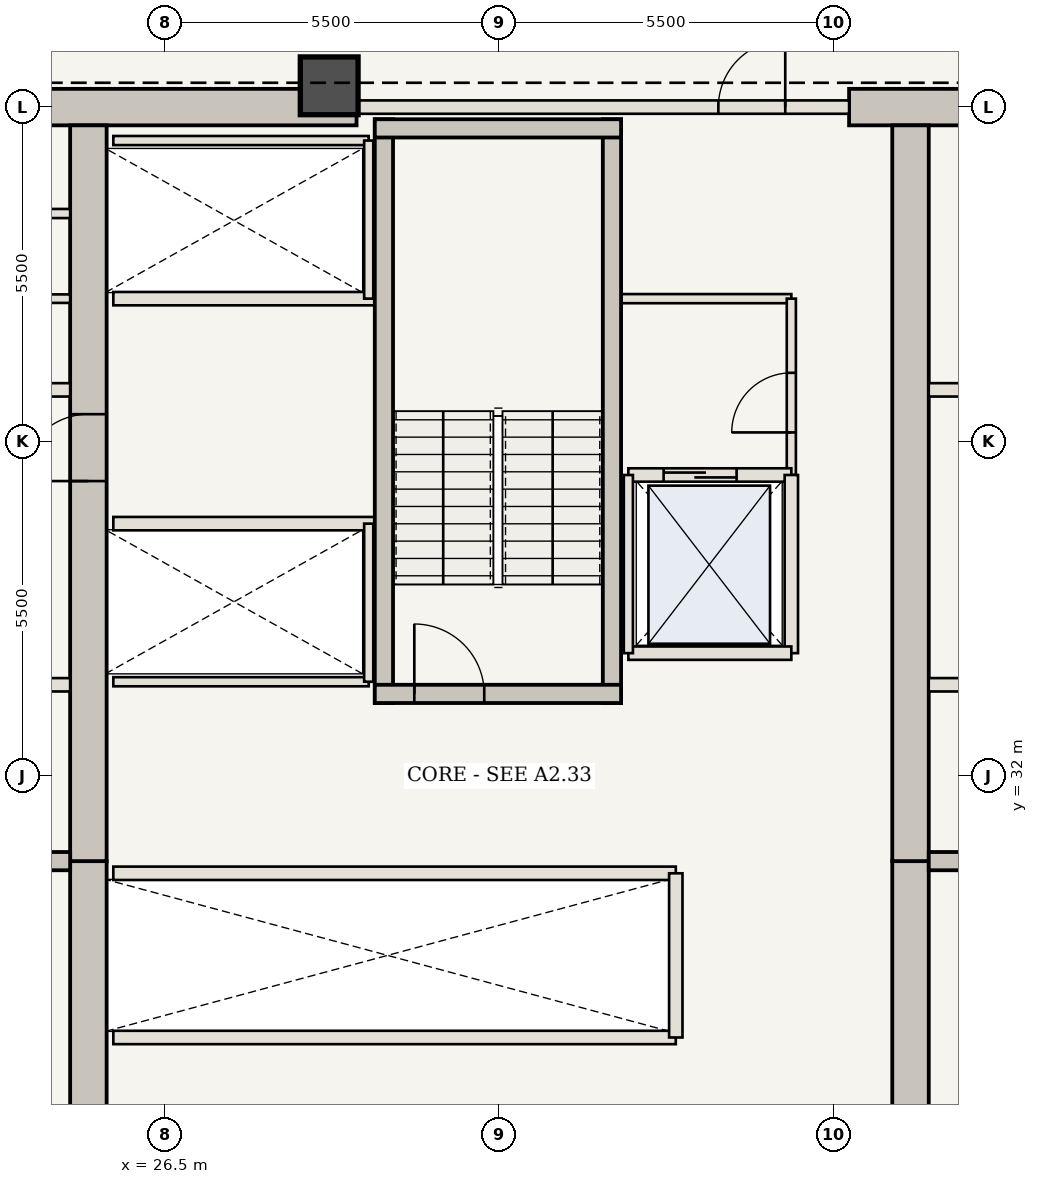
"""IFC4 building model, lengths in metres.
Left out: names, types, materials, properties, quantities, classifications, styles, units other than length and angle.
Written with IfcOpenShell. Run it as: python <this file> out.ifc"""

import sys

from ifc_helpers import new_model, si_unit, direction, frame, frame_2d, origin, origin_2d, place, context, subcontext, project, spatial, rectangle, extrude, element, fill, save


model = new_model("IFC4")
c1 = context("Model", 3, precision=1e-05, world=origin(), true_north=direction((0.0, 1.0)))
c2 = subcontext(c1, "Body", "Model", "MODEL_VIEW")
j1 = project(units=[si_unit("LENGTHUNIT", "METRE"), si_unit("PLANEANGLEUNIT", "RADIAN")], contexts=[c1])
p1 = place(None, origin())
s1 = spatial("IfcSite", under=j1, at=p1, CompositionType="ELEMENT")
p2 = place(p1, origin())
s2 = spatial("IfcBuilding", under=s1, at=p2, CompositionType="ELEMENT")
p3 = place(p2, frame((0.0, 0.0, 141.4)))
s3 = spatial("IfcBuildingStorey", under=s2, at=p3, CompositionType="ELEMENT", Elevation=141.4)
p4 = place(p3, frame((21.41, 43.0, 0.0), z_axis=(0.0, 0.0, 1.0), x_axis=(1.0, 0.0, 0.0)))
e1 = element("IfcWall", 1, at=p4, inside=s3, PredefinedType="SHEAR", context=c2, shape_type="SweptSolid", body=[
    extrude(rectangle(XDim=8.24, YDim=0.6, at=frame_2d((4.12, 0.0))), origin(), (0.0, 0.0, 1.0), 3.85),
])
p5 = place(p3, frame((37.75, 43.0, 0.0), z_axis=(0.0, 0.0, 1.0), x_axis=(1.0, 0.0, 0.0)))
e2 = element("IfcWall", 2, at=p5, inside=s3, PredefinedType="SHEAR", context=c2, shape_type="SweptSolid", body=[
    extrude(rectangle(XDim=4.84, YDim=0.6, at=frame_2d((2.42, 0.0))), origin(), (0.0, 0.0, 1.0), 3.85),
])
p6 = place(p3, frame((25.24, 21.25, 0.0), z_axis=(0.0, 0.0, 1.0), x_axis=(0.0, 1.0, 0.0)))
e3 = element("IfcWall", 3, at=p6, inside=s3, PredefinedType="SHEAR", context=c2, shape_type="SweptSolid", body=[
    extrude(rectangle(XDim=9.35, YDim=0.6, at=frame_2d((4.675, 0.0))), origin(), (0.0, 0.0, 1.0), 3.85),
])
p7 = place(p3, frame((25.24, 30.6, 0.0), z_axis=(0.0, 0.0, 1.0), x_axis=(0.0, 1.0, 0.0)))
e4 = element("IfcWall", 4, at=p7, inside=s3, PredefinedType="SHEAR", context=c2, shape_type="SweptSolid", body=[
    extrude(rectangle(XDim=12.1, YDim=0.6, at=frame_2d((6.05, 0.0))), origin(), (0.0, 0.0, 1.0), 3.85),
])
p8 = place(p7, frame((6.25, 0.0, 0.0)))
e5 = element("IfcOpeningElement", 5, at=p8, cuts=e4, PredefinedType="OPENING", context=c2, shape_type="SweptSolid", body=[
    extrude(rectangle(XDim=1.1, YDim=2.15, at=frame_2d((0.55, 1.075))), frame((0.0, 0.31, 0.0), z_axis=(0.0, -1.0, 0.0), x_axis=(1.0, 0.0, 0.0)), (0.0, 0.0, 1.0), 0.62),
])
p9 = place(p3, frame((38.76, 21.25, 0.0), z_axis=(0.0, 0.0, 1.0), x_axis=(0.0, 1.0, 0.0)))
e6 = element("IfcWall", 6, at=p9, inside=s3, PredefinedType="SHEAR", context=c2, shape_type="SweptSolid", body=[
    extrude(rectangle(XDim=9.35, YDim=0.6, at=frame_2d((4.675, 0.0))), origin(), (0.0, 0.0, 1.0), 3.85),
])
p10 = place(p3, frame((38.76, 30.6, 0.0), z_axis=(0.0, 0.0, 1.0), x_axis=(0.0, 1.0, 0.0)))
e7 = element("IfcWall", 7, at=p10, inside=s3, PredefinedType="SHEAR", context=c2, shape_type="SweptSolid", body=[
    extrude(rectangle(XDim=12.1, YDim=0.6, at=frame_2d((6.05, 0.0))), origin(), (0.0, 0.0, 1.0), 3.85),
])
p11 = place(p3, frame((29.2, 43.35, 0.0), z_axis=(0.0, 0.0, 1.0), x_axis=(1.0, 0.0, 0.0)))
e8 = element("IfcColumn", 8, at=p11, inside=s3, PredefinedType="COLUMN", context=c2, shape_type="SweptSolid", body=[
    extrude(rectangle(XDim=0.95, YDim=0.95, at=origin_2d()), origin(), (0.0, 0.0, 1.0), 3.85),
])
for number, where, z_axis, x_axis in (
    (9, (21.41, 30.6, 0.0), (0.0, 0.0, 1.0), (1.0, 0.0, 0.0)),
    (10, (39.06, 30.6, 0.0), (0.0, 0.0, 1.0), (1.0, 0.0, 0.0)),
):
    element("IfcWall", number, at=place(p3, frame(where, z_axis=z_axis, x_axis=x_axis)), inside=s3, PredefinedType="SHEAR", context=c2, shape_type="SweptSolid", body=[
        extrude(rectangle(XDim=3.53, YDim=0.3, at=frame_2d((1.765, 0.0))), origin(), (0.0, 0.0, 1.0), 3.685),
    ])
p12 = place(p3, frame((21.41, 33.5, 0.0), z_axis=(0.0, 0.0, 1.0), x_axis=(1.0, 0.0, 0.0)))
e11 = element("IfcWall", 11, at=p12, inside=s3, PredefinedType="STANDARD", context=c2, shape_type="SweptSolid", body=[
    extrude(rectangle(XDim=3.53, YDim=0.22, at=frame_2d((1.765, 0.0))), origin(), (0.0, 0.0, 1.0), 3.685),
])
p13 = place(p12, frame((0.75, 0.0, 0.0)))
e12 = element("IfcOpeningElement", 12, at=p13, cuts=e11, PredefinedType="OPENING", context=c2, shape_type="SweptSolid", body=[
    extrude(rectangle(XDim=1.2, YDim=2.2, at=frame_2d((0.6, 1.1))), frame((0.0, 0.12, 0.0), z_axis=(0.0, -1.0, 0.0), x_axis=(1.0, 0.0, 0.0)), (0.0, 0.0, 1.0), 0.24),
])
p14 = place(p3, frame((39.06, 33.5, 0.0), z_axis=(0.0, 0.0, 1.0), x_axis=(1.0, 0.0, 0.0)))
e13 = element("IfcWall", 13, at=p14, inside=s3, PredefinedType="STANDARD", context=c2, shape_type="SweptSolid", body=[
    extrude(rectangle(XDim=3.53, YDim=0.22, at=frame_2d((1.765, 0.0))), origin(), (0.0, 0.0, 1.0), 3.685),
])
p15 = place(p14, frame((1.55, 0.0, 0.0)))
e14 = element("IfcOpeningElement", 14, at=p15, cuts=e13, PredefinedType="OPENING", context=c2, shape_type="SweptSolid", body=[
    extrude(rectangle(XDim=1.2, YDim=2.2, at=frame_2d((0.6, 1.1))), frame((0.0, 0.12, 0.0), z_axis=(0.0, -1.0, 0.0), x_axis=(1.0, 0.0, 0.0)), (0.0, 0.0, 1.0), 0.24),
])
for number, where, z_axis, x_axis in (
    (15, (21.41, 38.35, 0.0), (0.0, 0.0, 1.0), (1.0, 0.0, 0.0)),
    (16, (39.06, 38.35, 0.0), (0.0, 0.0, 1.0), (1.0, 0.0, 0.0)),
):
    element("IfcWall", number, at=place(p3, frame(where, z_axis=z_axis, x_axis=x_axis)), inside=s3, PredefinedType="STANDARD", context=c2, shape_type="SweptSolid", body=[
        extrude(rectangle(XDim=3.53, YDim=0.22, at=frame_2d((1.765, 0.0))), origin(), (0.0, 0.0, 1.0), 3.685),
    ])
p16 = place(p3, frame((21.41, 39.85, 0.0), z_axis=(0.0, 0.0, 1.0), x_axis=(1.0, 0.0, 0.0)))
e17 = element("IfcWall", 17, at=p16, inside=s3, PredefinedType="STANDARD", context=c2, shape_type="SweptSolid", body=[
    extrude(rectangle(XDim=3.53, YDim=0.14, at=frame_2d((1.765, 0.0))), origin(), (0.0, 0.0, 1.0), 3.685),
])
p17 = place(p3, frame((21.41, 41.25, 0.0), z_axis=(0.0, 0.0, 1.0), x_axis=(1.0, 0.0, 0.0)))
e18 = element("IfcWall", 18, at=p17, inside=s3, PredefinedType="STANDARD", context=c2, shape_type="SweptSolid", body=[
    extrude(rectangle(XDim=3.53, YDim=0.15, at=frame_2d((1.765, 0.0))), origin(), (0.0, 0.0, 1.0), 3.685),
])
p18 = place(p3, frame((34.0, 39.85, 0.0), z_axis=(0.0, 0.0, 1.0), x_axis=(1.0, 0.0, 0.0)))
e19 = element("IfcWall", 19, at=p18, inside=s3, PredefinedType="STANDARD", context=c2, shape_type="SweptSolid", body=[
    extrude(rectangle(XDim=2.8, YDim=0.15, at=frame_2d((1.4, 0.0))), origin(), (0.0, 0.0, 1.0), 3.685),
])
p19 = place(p3, frame((36.8, 36.95, 0.0), z_axis=(0.0, 0.0, 1.0), x_axis=(0.0, 1.0, 0.0)))
e20 = element("IfcWall", 20, at=p19, inside=s3, PredefinedType="STANDARD", context=c2, shape_type="SweptSolid", body=[
    extrude(rectangle(XDim=2.9, YDim=0.15, at=frame_2d((1.45, 0.0))), origin(), (0.0, 0.0, 1.0), 3.685),
])
p20 = place(p19, frame((0.7, 0.0, 0.0)))
e21 = element("IfcOpeningElement", 21, at=p20, cuts=e20, PredefinedType="OPENING", context=c2, shape_type="SweptSolid", body=[
    extrude(rectangle(XDim=0.98, YDim=2.2, at=frame_2d((0.49, 1.1))), frame((0.0, 0.085, 0.0), z_axis=(0.0, -1.0, 0.0), x_axis=(1.0, 0.0, 0.0)), (0.0, 0.0, 1.0), 0.17),
])
for number, where, z_axis, x_axis in (
    (22, (25.65, 27.7, 0.0), (0.0, 0.0, 1.0), (1.0, 0.0, 0.0)),
    (23, (25.65, 30.4, 0.0), (0.0, 0.0, 1.0), (1.0, 0.0, 0.0)),
):
    element("IfcWall", number, at=place(p3, frame(where, z_axis=z_axis, x_axis=x_axis)), inside=s3, PredefinedType="STANDARD", context=c2, shape_type="SweptSolid", body=[
        extrude(rectangle(XDim=9.25, YDim=0.22, at=frame_2d((4.625, 0.0))), origin(), (0.0, 0.0, 1.0), 3.685),
    ])
p21 = place(p3, frame((34.9, 27.7, 0.0), z_axis=(0.0, 0.0, 1.0), x_axis=(0.0, 1.0, 0.0)))
e24 = element("IfcWall", 24, at=p21, inside=s3, PredefinedType="STANDARD", context=c2, shape_type="SweptSolid", body=[
    extrude(rectangle(XDim=2.7, YDim=0.22, at=frame_2d((1.35, 0.0))), origin(), (0.0, 0.0, 1.0), 3.685),
])
p22 = place(p3, frame((25.65, 36.15, 0.0), z_axis=(0.0, 0.0, 1.0), x_axis=(1.0, 0.0, 0.0)))
e25 = element("IfcWall", 25, at=p22, inside=s3, PredefinedType="STANDARD", context=c2, shape_type="SweptSolid", body=[
    extrude(rectangle(XDim=4.3, YDim=0.22, at=frame_2d((2.15, 0.0))), origin(), (0.0, 0.0, 1.0), 3.685),
])
p23 = place(p3, frame((25.65, 33.55, 0.0), z_axis=(0.0, 0.0, 1.0), x_axis=(1.0, 0.0, 0.0)))
e26 = element("IfcWall", 26, at=p23, inside=s3, PredefinedType="STANDARD", context=c2, shape_type="SweptSolid", body=[
    extrude(rectangle(XDim=4.2, YDim=0.15, at=frame_2d((2.1, 0.0))), origin(), (0.0, 0.0, 1.0), 3.685),
])
p24 = place(p3, frame((29.85, 33.55, 0.0), z_axis=(0.0, 0.0, 1.0), x_axis=(0.0, 1.0, 0.0)))
e27 = element("IfcWall", 27, at=p24, inside=s3, PredefinedType="STANDARD", context=c2, shape_type="SweptSolid", body=[
    extrude(rectangle(XDim=2.6, YDim=0.15, at=frame_2d((1.3, 0.0))), origin(), (0.0, 0.0, 1.0), 3.685),
])
p25 = place(p3, frame((25.65, 39.85, 0.0), z_axis=(0.0, 0.0, 1.0), x_axis=(1.0, 0.0, 0.0)))
e28 = element("IfcWall", 28, at=p25, inside=s3, PredefinedType="STANDARD", context=c2, shape_type="SweptSolid", body=[
    extrude(rectangle(XDim=4.3, YDim=0.22, at=frame_2d((2.15, 0.0))), origin(), (0.0, 0.0, 1.0), 3.685),
])
p26 = place(p3, frame((25.65, 42.45, 0.0), z_axis=(0.0, 0.0, 1.0), x_axis=(1.0, 0.0, 0.0)))
e29 = element("IfcWall", 29, at=p26, inside=s3, PredefinedType="STANDARD", context=c2, shape_type="SweptSolid", body=[
    extrude(rectangle(XDim=4.2, YDim=0.15, at=frame_2d((2.1, 0.0))), origin(), (0.0, 0.0, 1.0), 3.685),
])
p27 = place(p3, frame((29.85, 39.85, 0.0), z_axis=(0.0, 0.0, 1.0), x_axis=(0.0, 1.0, 0.0)))
e30 = element("IfcWall", 30, at=p27, inside=s3, PredefinedType="STANDARD", context=c2, shape_type="SweptSolid", body=[
    extrude(rectangle(XDim=2.6, YDim=0.15, at=frame_2d((1.3, 0.0))), origin(), (0.0, 0.0, 1.0), 3.685),
])
for number, where, z_axis, x_axis in (
    (31, (30.1, 33.2, 0.0), (0.0, 0.0, 1.0), (0.0, 1.0, 0.0)),
    (32, (33.85, 33.2, 0.0), (0.0, 0.0, 1.0), (0.0, 1.0, 0.0)),
):
    element("IfcWall", number, at=place(p3, frame(where, z_axis=z_axis, x_axis=x_axis)), inside=s3, PredefinedType="SHEAR", context=c2, shape_type="SweptSolid", body=[
        extrude(rectangle(XDim=9.6, YDim=0.3, at=frame_2d((4.8, 0.0))), origin(), (0.0, 0.0, 1.0), 3.685),
    ])
p28 = place(p3, frame((29.95, 33.35, 0.0), z_axis=(0.0, 0.0, 1.0), x_axis=(1.0, 0.0, 0.0)))
e33 = element("IfcWall", 33, at=p28, inside=s3, PredefinedType="SHEAR", context=c2, shape_type="SweptSolid", body=[
    extrude(rectangle(XDim=4.05, YDim=0.3, at=frame_2d((2.025, 0.0))), origin(), (0.0, 0.0, 1.0), 3.685),
])
p29 = place(p28, frame((0.65, 0.0, 0.0)))
e34 = element("IfcOpeningElement", 34, at=p29, cuts=e33, PredefinedType="OPENING", context=c2, shape_type="SweptSolid", body=[
    extrude(rectangle(XDim=1.15, YDim=2.15, at=frame_2d((0.575, 1.075))), frame((0.0, 0.16, 0.0), z_axis=(0.0, -1.0, 0.0), x_axis=(1.0, 0.0, 0.0)), (0.0, 0.0, 1.0), 0.32),
])
p30 = place(p3, frame((29.95, 42.65, 0.0), z_axis=(0.0, 0.0, 1.0), x_axis=(1.0, 0.0, 0.0)))
e35 = element("IfcWall", 35, at=p30, inside=s3, PredefinedType="SHEAR", context=c2, shape_type="SweptSolid", body=[
    extrude(rectangle(XDim=4.05, YDim=0.3, at=frame_2d((2.025, 0.0))), origin(), (0.0, 0.0, 1.0), 3.685),
])
p31 = place(p3, frame((29.65, 43.0, 0.0), z_axis=(0.0, 0.0, 1.0), x_axis=(1.0, 0.0, 0.0)))
e36 = element("IfcWall", 36, at=p31, inside=s3, PredefinedType="STANDARD", context=c2, shape_type="SweptSolid", body=[
    extrude(rectangle(XDim=8.1, YDim=0.22, at=frame_2d((4.05, 0.0))), origin(), (0.0, 0.0, 1.0), 3.685),
])
p32 = place(p31, frame((5.95, 0.0, 0.0)))
e37 = element("IfcOpeningElement", 37, at=p32, cuts=e36, PredefinedType="OPENING", context=c2, shape_type="SweptSolid", body=[
    extrude(rectangle(XDim=1.1, YDim=2.15, at=frame_2d((0.55, 1.075))), frame((0.0, 0.12, 0.0), z_axis=(0.0, -1.0, 0.0), x_axis=(1.0, 0.0, 0.0)), (0.0, 0.0, 1.0), 0.24),
])
p33 = place(p3, frame((34.12, 36.95, 0.0), z_axis=(0.0, 0.0, 1.0), x_axis=(1.0, 0.0, 0.0)))
e38 = element("IfcWall", 38, at=p33, inside=s3, PredefinedType="STANDARD", context=c2, shape_type="SweptSolid", body=[
    extrude(rectangle(XDim=2.68, YDim=0.22, at=frame_2d((1.34, 0.0))), origin(), (0.0, 0.0, 1.0), 3.685),
])
p34 = place(p33, frame((0.58, 0.0, 0.0)))
e39 = element("IfcOpeningElement", 39, at=p34, cuts=e38, PredefinedType="OPENING", context=c2, shape_type="SweptSolid", body=[
    extrude(rectangle(XDim=1.2, YDim=2.2, at=frame_2d((0.6, 1.1))), frame((0.0, 0.12, 0.0), z_axis=(0.0, -1.0, 0.0), x_axis=(1.0, 0.0, 0.0)), (0.0, 0.0, 1.0), 0.24),
])
p35 = place(p3, frame((36.8, 34.02, 0.0), z_axis=(0.0, 0.0, 1.0), x_axis=(0.0, 1.0, 0.0)))
e40 = element("IfcWall", 40, at=p35, inside=s3, PredefinedType="STANDARD", context=c2, shape_type="SweptSolid", body=[
    extrude(rectangle(XDim=2.93, YDim=0.22, at=frame_2d((1.465, 0.0))), origin(), (0.0, 0.0, 1.0), 3.685),
])
p36 = place(p3, frame((34.12, 34.02, 0.0), z_axis=(0.0, 0.0, 1.0), x_axis=(1.0, 0.0, 0.0)))
e41 = element("IfcWall", 41, at=p36, inside=s3, PredefinedType="STANDARD", context=c2, shape_type="SweptSolid", body=[
    extrude(rectangle(XDim=2.68, YDim=0.22, at=frame_2d((1.34, 0.0))), origin(), (0.0, 0.0, 1.0), 3.685),
])
p37 = place(p3, frame((34.12, 34.02, 0.0), z_axis=(0.0, 0.0, 1.0), x_axis=(0.0, 1.0, 0.0)))
e42 = element("IfcWall", 42, at=p37, inside=s3, PredefinedType="STANDARD", context=c2, shape_type="SweptSolid", body=[
    extrude(rectangle(XDim=2.93, YDim=0.15, at=frame_2d((1.465, 0.0))), origin(), (0.0, 0.0, 1.0), 3.685),
])
p38 = place(p8, origin())
e43 = element("IfcDoor", 43, at=p38, inside=s3, OperationType="SINGLE_SWING_LEFT", PredefinedType="DOOR", context=c2, shape_type="SweptSolid", body=[
    extrude(rectangle(XDim=1.1, YDim=2.15, at=frame_2d((0.55, 1.075))), frame((0.0, 0.025, 0.0), z_axis=(0.0, -1.0, 0.0), x_axis=(1.0, 0.0, 0.0)), (0.0, 0.0, 1.0), 0.05),
])
fill(e5, e43)
p39 = place(p20, origin())
e44 = element("IfcDoor", 44, at=p39, inside=s3, OperationType="SINGLE_SWING_LEFT", PredefinedType="DOOR", context=c2, shape_type="SweptSolid", body=[
    extrude(rectangle(XDim=0.98, YDim=2.2, at=frame_2d((0.49, 1.1))), frame((0.0, 0.025, 0.0), z_axis=(0.0, -1.0, 0.0), x_axis=(1.0, 0.0, 0.0)), (0.0, 0.0, 1.0), 0.05),
])
fill(e21, e44)
p40 = place(p29, origin())
e45 = element("IfcDoor", 45, at=p40, inside=s3, OperationType="SINGLE_SWING_LEFT", PredefinedType="DOOR", context=c2, shape_type="SweptSolid", body=[
    extrude(rectangle(XDim=1.15, YDim=2.15, at=frame_2d((0.575, 1.075))), frame((0.0, 0.025, 0.0), z_axis=(0.0, -1.0, 0.0), x_axis=(1.0, 0.0, 0.0)), (0.0, 0.0, 1.0), 0.05),
])
fill(e34, e45)
p41 = place(p32, origin())
e46 = element("IfcDoor", 46, at=p41, inside=s3, OperationType="SINGLE_SWING_RIGHT", PredefinedType="DOOR", context=c2, shape_type="SweptSolid", body=[
    extrude(rectangle(XDim=1.1, YDim=2.15, at=frame_2d((0.55, 1.075))), frame((0.0, 0.025, 0.0), z_axis=(0.0, -1.0, 0.0), x_axis=(1.0, 0.0, 0.0)), (0.0, 0.0, 1.0), 0.05),
])
fill(e37, e46)
p42 = place(p34, origin())
e47 = element("IfcDoor", 47, at=p42, inside=s3, OperationType="DOUBLE_DOOR_SLIDING", PredefinedType="DOOR", context=c2, shape_type="SweptSolid", body=[
    extrude(rectangle(XDim=1.2, YDim=2.2, at=frame_2d((0.6, 1.1))), frame((0.0, 0.025, 0.0), z_axis=(0.0, -1.0, 0.0), x_axis=(1.0, 0.0, 0.0)), (0.0, 0.0, 1.0), 0.05),
])
fill(e39, e47)
save(model, sys.argv[1])
